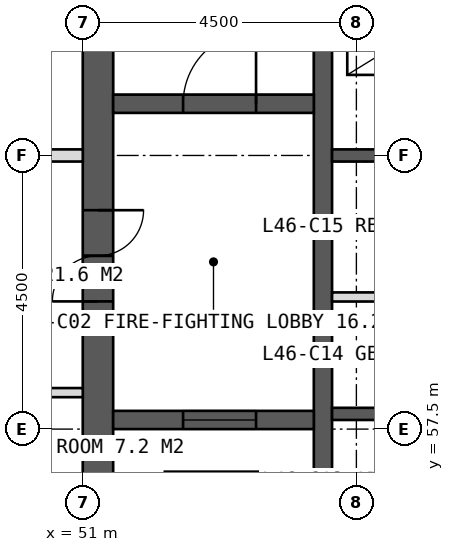
"""IFC4 building model, lengths in metres.
Left out: names, types, materials, properties, quantities, classifications, styles, units other than length and angle.
Written with IfcOpenShell. Run it as: python <this file> out.ifc"""

import sys

from ifc_helpers import new_model, si_unit, direction, frame, frame_2d, origin, place, context, subcontext, project, spatial, rectangle, extrude, element, fill, save


model = new_model("IFC4")
c1 = context("Model", 3, precision=1e-05, world=origin(), true_north=direction((0.0, 1.0)))
c2 = subcontext(c1, "Body", "Model", "MODEL_VIEW")
j1 = project(units=[si_unit("LENGTHUNIT", "METRE"), si_unit("PLANEANGLEUNIT", "RADIAN")], contexts=[c1])
p1 = place(None, origin())
s1 = spatial("IfcSite", under=j1, at=p1, CompositionType="ELEMENT")
p2 = place(p1, origin())
s2 = spatial("IfcBuilding", under=s1, at=p2, CompositionType="ELEMENT")
p3 = place(p2, frame((0.0, 0.0, 193.0)))
s3 = spatial("IfcBuildingStorey", under=s2, at=p3, CompositionType="ELEMENT", Elevation=193.0)
p4 = place(p3, frame((51.25, 53.5, 0.0), z_axis=(0.0, 0.0, 1.0), x_axis=(0.0, 1.0, 0.0)))
e1 = element("IfcWall", 1, at=p4, inside=s3, PredefinedType="SHEAR", context=c2, shape_type="SweptSolid", body=[
    extrude(rectangle(XDim=17.0, YDim=0.5, at=frame_2d((8.5, 0.0))), origin(), (0.0, 0.0, 1.0), 4.0),
])
p5 = place(p4, frame((6.1, 0.0, 0.0)))
e2 = element("IfcOpeningElement", 2, at=p5, cuts=e1, PredefinedType="OPENING", context=c2, shape_type="SweptSolid", body=[
    extrude(rectangle(XDim=1.5, YDim=2.2, at=frame_2d((0.75, 1.1))), frame((0.0, 0.26, 0.0), z_axis=(0.0, -1.0, 0.0), x_axis=(1.0, 0.0, 0.0)), (0.0, 0.0, 1.0), 0.52),
])
p6 = place(p3, frame((54.95, 53.5, 0.0), z_axis=(0.0, 0.0, 1.0), x_axis=(0.0, 1.0, 0.0)))
e3 = element("IfcWall", 3, at=p6, inside=s3, PredefinedType="SHEAR", context=c2, shape_type="SweptSolid", body=[
    extrude(rectangle(XDim=17.0, YDim=0.3, at=frame_2d((8.5, 0.0))), origin(), (0.0, 0.0, 1.0), 4.0),
])
for number, where, z_axis, x_axis in (
    (4, (55.1, 57.75, 0.0), (0.0, 0.0, 1.0), (1.0, 0.0, 0.0)),
    (5, (55.1, 62.0, 0.0), (0.0, 0.0, 1.0), (1.0, 0.0, 0.0)),
):
    element("IfcWall", number, at=place(p3, frame(where, z_axis=z_axis, x_axis=x_axis)), inside=s3, PredefinedType="SHEAR", context=c2, shape_type="SweptSolid", body=[
        extrude(rectangle(XDim=3.05, YDim=0.2, at=frame_2d((1.525, 0.0))), origin(), (0.0, 0.0, 1.0), 4.0),
    ])
p7 = place(p3, frame((51.5, 62.85, 0.0), z_axis=(0.0, 0.0, 1.0), x_axis=(1.0, 0.0, 0.0)))
e6 = element("IfcWall", 6, at=p7, inside=s3, PredefinedType="SHEAR", context=c2, shape_type="SweptSolid", body=[
    extrude(rectangle(XDim=3.3, YDim=0.3, at=frame_2d((1.65, 0.0))), origin(), (0.0, 0.0, 1.0), 4.0),
])
p8 = place(p7, frame((1.15, 0.0, 0.0)))
e7 = element("IfcOpeningElement", 7, at=p8, cuts=e6, PredefinedType="OPENING", context=c2, shape_type="SweptSolid", body=[
    extrude(rectangle(XDim=1.2, YDim=2.1, at=frame_2d((0.6, 1.05))), frame((0.0, 0.16, 0.0), z_axis=(0.0, -1.0, 0.0), x_axis=(1.0, 0.0, 0.0)), (0.0, 0.0, 1.0), 0.32),
])
p9 = place(p3, frame((51.5, 57.65, 0.0), z_axis=(0.0, 0.0, 1.0), x_axis=(1.0, 0.0, 0.0)))
e8 = element("IfcWall", 8, at=p9, inside=s3, PredefinedType="SHEAR", context=c2, shape_type="SweptSolid", body=[
    extrude(rectangle(XDim=3.3, YDim=0.3, at=frame_2d((1.65, 0.0))), origin(), (0.0, 0.0, 1.0), 4.0),
])
p10 = place(p9, frame((1.15, 0.0, 0.0)))
e9 = element("IfcOpeningElement", 9, at=p10, cuts=e8, PredefinedType="OPENING", context=c2, shape_type="SweptSolid", body=[
    extrude(rectangle(XDim=1.2, YDim=2.2, at=frame_2d((0.6, 1.1))), frame((0.0, 0.16, 0.0), z_axis=(0.0, -1.0, 0.0), x_axis=(1.0, 0.0, 0.0)), (0.0, 0.0, 1.0), 0.32),
])
p11 = place(p3, frame((51.0, 58.1, 0.0), z_axis=(0.0, 0.0, 1.0), x_axis=(-1.0, 0.0, 0.0)))
e10 = element("IfcWall", 10, at=p11, inside=s3, PredefinedType="PARTITIONING", context=c2, shape_type="SweptSolid", body=[
    extrude(rectangle(XDim=5.4, YDim=0.15, at=frame_2d((2.7, 0.0))), origin(), (0.0, 0.0, 1.0), 3.75),
])
p12 = place(p11, frame((0.6, 0.0, 0.0)))
e11 = element("IfcOpeningElement", 11, at=p12, cuts=e10, PredefinedType="OPENING", context=c2, shape_type="SweptSolid", body=[
    extrude(rectangle(XDim=0.9, YDim=2.1, at=frame_2d((0.45, 1.05))), frame((0.0, 0.085, 0.0), z_axis=(0.0, -1.0, 0.0), x_axis=(1.0, 0.0, 0.0)), (0.0, 0.0, 1.0), 0.17),
])
p13 = place(p3, frame((51.0, 62.0, 0.0), z_axis=(0.0, 0.0, 1.0), x_axis=(-1.0, 0.0, 0.0)))
e12 = element("IfcWall", 12, at=p13, inside=s3, PredefinedType="SOLIDWALL", context=c2, shape_type="SweptSolid", body=[
    extrude(rectangle(XDim=5.4, YDim=0.2, at=frame_2d((2.7, 0.0))), origin(), (0.0, 0.0, 1.0), 2.95),
])
p14 = place(p3, frame((55.1, 59.673, 0.0), z_axis=(0.0, 0.0, 1.0), x_axis=(1.0, 0.0, 0.0)))
e13 = element("IfcWall", 13, at=p14, inside=s3, PredefinedType="PARTITIONING", context=c2, shape_type="SweptSolid", body=[
    extrude(rectangle(XDim=3.05, YDim=0.15, at=frame_2d((1.525, 0.0))), origin(), (0.0, 0.0, 1.0), 3.75),
])
p15 = place(p5, origin())
e14 = element("IfcDoor", 14, at=p15, inside=s3, OperationType="DOUBLE_DOOR_SINGLE_SWING", PredefinedType="DOOR", context=c2, shape_type="SweptSolid", body=[
    extrude(rectangle(XDim=1.5, YDim=2.2, at=frame_2d((0.75, 1.1))), frame((0.0, 0.025, 0.0), z_axis=(0.0, -1.0, 0.0), x_axis=(1.0, 0.0, 0.0)), (0.0, 0.0, 1.0), 0.05),
])
fill(e2, e14)
p16 = place(p8, origin())
e15 = element("IfcDoor", 15, at=p16, inside=s3, OperationType="SINGLE_SWING_RIGHT", PredefinedType="DOOR", context=c2, shape_type="SweptSolid", body=[
    extrude(rectangle(XDim=1.2, YDim=2.1, at=frame_2d((0.6, 1.05))), frame((0.0, 0.025, 0.0), z_axis=(0.0, -1.0, 0.0), x_axis=(1.0, 0.0, 0.0)), (0.0, 0.0, 1.0), 0.05),
])
fill(e7, e15)
p17 = place(p10, origin())
e16 = element("IfcDoor", 16, at=p17, inside=s3, OperationType="SLIDING_TO_LEFT", PredefinedType="DOOR", context=c2, shape_type="SweptSolid", body=[
    extrude(rectangle(XDim=1.2, YDim=2.2, at=frame_2d((0.6, 1.1))), frame((0.0, 0.025, 0.0), z_axis=(0.0, -1.0, 0.0), x_axis=(1.0, 0.0, 0.0)), (0.0, 0.0, 1.0), 0.05),
])
fill(e9, e16)
save(model, sys.argv[1])
